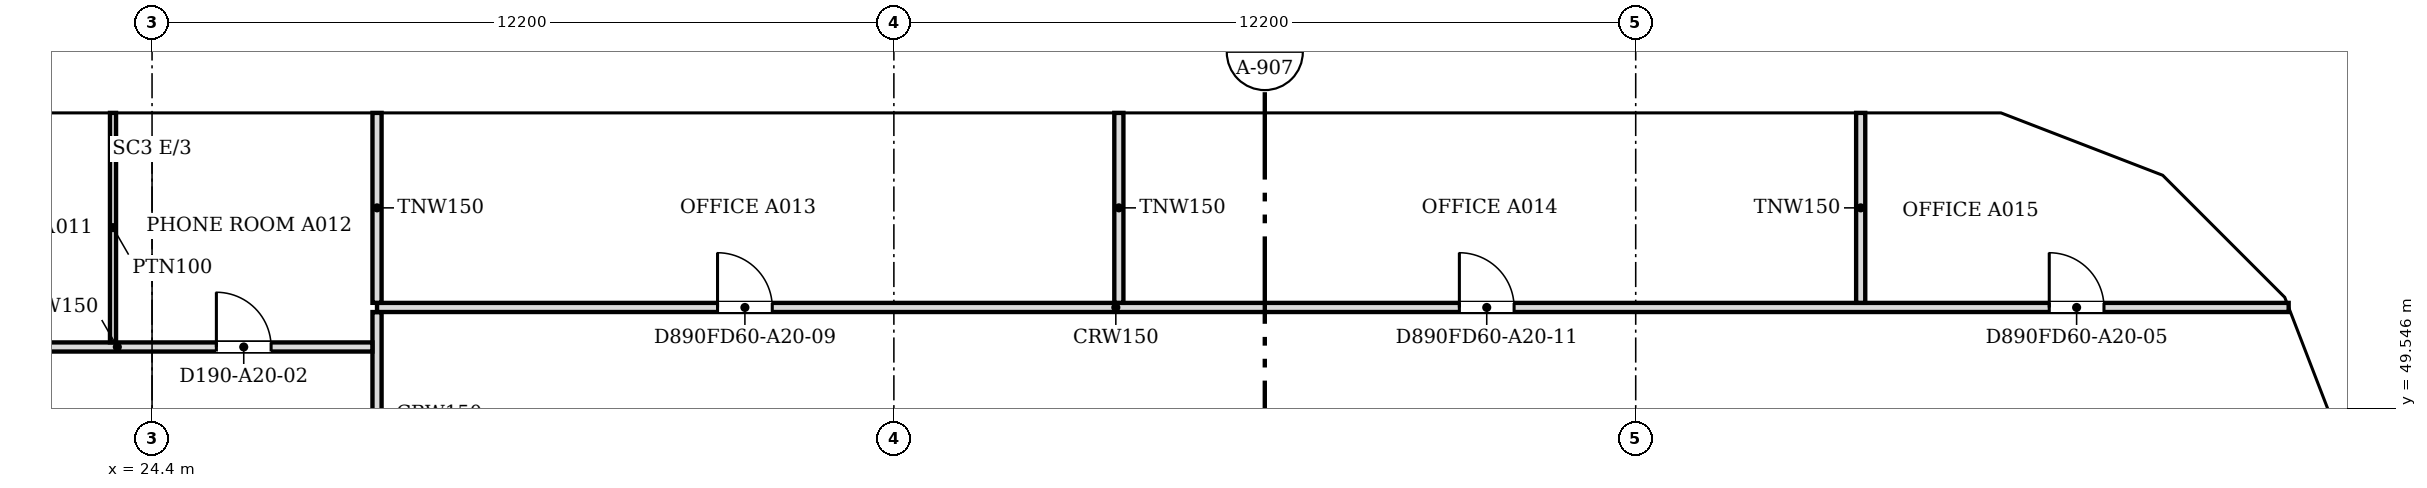
"""IFC4 building model, lengths in metres.
Left out: names, types, materials, properties, quantities, classifications, styles, units other than length and angle.
Written with IfcOpenShell. Run it as: python <this file> out.ifc"""

import sys

from ifc_helpers import new_model, si_unit, direction, frame, frame_2d, origin, place, context, subcontext, project, spatial, polyline, rectangle, outline, extrude, faceted_brep, source, transform, mapped, element, fill, save


model = new_model("IFC4")
c1 = context("Model", 3, precision=1e-05, world=origin(), true_north=direction((0.0, 1.0)))
c2 = subcontext(c1, "Body", "Model", "MODEL_VIEW")
j1 = project(units=[si_unit("LENGTHUNIT", "METRE"), si_unit("PLANEANGLEUNIT", "RADIAN")], contexts=[c1])
p1 = place(None, origin())
s1 = spatial("IfcSite", under=j1, at=p1, CompositionType="ELEMENT")
p2 = place(p1, origin())
s2 = spatial("IfcBuilding", under=s1, at=p2, CompositionType="ELEMENT")
p3 = place(p2, frame((0.0, 0.0, 220.7)))
s3 = spatial("IfcBuildingStorey", under=s2, at=p3, CompositionType="ELEMENT", Elevation=220.7)
m1 = source(origin(), c2, "Body", "Brep", [
    faceted_brep([(2.95, -0.25, 0.0), (3.003, -0.25, 0.068), (3.003, -0.25, 7.532), (2.95, -0.25, 7.6), (0.0, -0.25, 3.8), (0.047, 0.25, 3.86), (2.898, 0.25, 7.532), (2.898, 0.25, 0.068), (0.047, 0.25, 3.74), (2.95, 0.0, 0.0), (2.95, 0.0, 7.6), (0.0, 0.0, 3.8)], [[[0, 1, 2, 3, 4]], [[5, 6, 7, 8]], [[1, 0, 9]], [[10, 3, 2]], [[6, 5, 11, 4, 3, 10]], [[8, 7, 9, 0, 4, 11]], [[8, 11, 5]], [[1, 9, 7, 6, 10, 2]]]),
])
p4 = place(p3, frame((60.75, 48.753, -3.8), z_axis=(0.0, 0.0, 1.0), x_axis=(-0.35992665181, 0.932980602862, 0.0)))
e1 = element("IfcWall", 1, at=p4, inside=s3, PredefinedType="SOLIDWALL", context=c2, shape_type="MappedRepresentation", body=[
    mapped(m1, transform((0.0, 0.0, 0.0), scale=1.0)),
])
m2 = source(origin(), c2, "Body", "SweptSolid", [
    extrude(outline(polyline([(2.75, 6.935), (0.316, 3.8), (2.75, 0.665), (2.75, 6.935)])), frame((0.0, 0.26, 0.0), z_axis=(0.0, -1.0, 0.0), x_axis=(1.0, 0.0, 0.0)), (0.0, 0.0, 1.0), 0.52),
])
p5 = place(p4, origin())
e2 = element("IfcOpeningElement", 2, at=p5, cuts=e1, PredefinedType="OPENING", context=c2, shape_type="MappedRepresentation", body=[
    mapped(m2, transform((0.0, 0.0, 0.0), scale=1.0)),
])
m3 = source(origin(), c2, "Body", "Brep", [
    faceted_brep([(0.053, -0.25, 0.0), (2.997, -0.25, 3.8), (0.053, -0.25, 7.6), (0.0, -0.25, 7.532), (0.0, -0.25, 0.068), (0.106, 0.25, 7.532), (2.944, 0.25, 3.868), (2.944, 0.25, 3.732), (0.106, 0.25, 0.068), (2.997, 0.0, 3.8), (0.053, 0.0, 0.0), (0.053, 0.0, 7.6)], [[[0, 1, 2, 3, 4]], [[5, 6, 7, 8]], [[8, 7, 9, 1, 0, 10]], [[6, 5, 11, 2, 1, 9]], [[3, 2, 11]], [[10, 0, 4]], [[8, 10, 4, 3, 11, 5]], [[9, 7, 6]]]),
])
p6 = place(p3, frame((59.726, 51.469, -3.8), z_axis=(0.0, 0.0, 1.0), x_axis=(-0.707106781187, 0.707106781187, 0.0)))
e3 = element("IfcWall", 3, at=p6, inside=s3, PredefinedType="SOLIDWALL", context=c2, shape_type="MappedRepresentation", body=[
    mapped(m3, transform((0.0, 0.0, 0.0), scale=1.0)),
])
m4 = source(origin(), c2, "Body", "SweptSolid", [
    extrude(outline(polyline([(0.253, 0.667), (2.681, 3.8), (0.253, 6.934), (0.253, 0.667)])), frame((0.0, 0.26, 0.0), z_axis=(0.0, -1.0, 0.0), x_axis=(1.0, 0.0, 0.0)), (0.0, 0.0, 1.0), 0.52),
])
p7 = place(p6, origin())
e4 = element("IfcOpeningElement", 4, at=p7, cuts=e3, PredefinedType="OPENING", context=c2, shape_type="MappedRepresentation", body=[
    mapped(m4, transform((0.0, 0.0, 0.0), scale=1.0)),
])
m5 = source(origin(), c2, "Body", "Brep", [
    faceted_brep([(2.95, -0.25, 0.0), (2.997, -0.25, 0.059), (2.997, -0.25, 7.541), (2.95, -0.25, 7.6), (0.0, -0.25, 3.8), (0.053, 0.25, 3.868), (2.904, 0.25, 7.54), (2.904, 0.25, 0.06), (0.053, 0.25, 3.732), (2.95, 0.0, 0.0), (2.95, 0.0, 7.6), (0.0, 0.0, 3.8)], [[[0, 1, 2, 3, 4]], [[5, 6, 7, 8]], [[1, 0, 9]], [[10, 3, 2]], [[6, 5, 11, 4, 3, 10]], [[8, 7, 9, 0, 4, 11]], [[8, 11, 5]], [[1, 9, 7, 6, 10, 2]]]),
])
p8 = place(p3, frame((57.606, 53.588, -3.8), z_axis=(0.0, 0.0, 1.0), x_axis=(-0.932990326376, 0.359901446078, 0.0)))
e5 = element("IfcWall", 5, at=p8, inside=s3, PredefinedType="SOLIDWALL", context=c2, shape_type="MappedRepresentation", body=[
    mapped(m5, transform((0.0, 0.0, 0.0), scale=1.0)),
])
p9 = place(p8, origin())
e6 = element("IfcOpeningElement", 6, at=p9, cuts=e5, PredefinedType="OPENING", context=c2, shape_type="MappedRepresentation", body=[
    mapped(m2, transform((0.0, 0.0, 0.0), scale=1.0)),
])
m6 = source(origin(), c2, "Body", "Brep", [
    faceted_brep([(0.047, -0.25, 0.0), (3.05, -0.25, 3.8), (0.047, -0.25, 7.6), (0.0, -0.25, 7.54), (0.0, -0.25, 0.06), (0.093, 0.25, 7.541), (3.05, 0.25, 3.8), (0.093, 0.25, 0.059), (0.047, 0.0, 0.0), (0.047, 0.0, 7.6)], [[[0, 1, 2, 3, 4]], [[5, 6, 7]], [[7, 6, 1, 0, 8]], [[6, 5, 9, 2, 1]], [[3, 2, 9]], [[8, 0, 4]], [[7, 8, 4, 3, 9, 5]]]),
])
p10 = place(p3, frame((54.9, 54.65, -3.8), z_axis=(0.0, 0.0, 1.0), x_axis=(-1.0, 0.0, 0.0)))
e7 = element("IfcWall", 7, at=p10, inside=s3, PredefinedType="SOLIDWALL", context=c2, shape_type="MappedRepresentation", body=[
    mapped(m6, transform((0.0, 0.0, 0.0), scale=1.0)),
])
m7 = source(origin(), c2, "Body", "SweptSolid", [
    extrude(outline(polyline([(0.247, 0.656), (2.731, 3.8), (0.247, 6.944), (0.247, 0.656)])), frame((0.0, 0.26, 0.0), z_axis=(0.0, -1.0, 0.0), x_axis=(1.0, 0.0, 0.0)), (0.0, 0.0, 1.0), 0.52),
])
p11 = place(p10, origin())
e8 = element("IfcOpeningElement", 8, at=p11, cuts=e7, PredefinedType="OPENING", context=c2, shape_type="MappedRepresentation", body=[
    mapped(m7, transform((0.0, 0.0, 0.0), scale=1.0)),
])
m8 = source(origin(), c2, "Body", "SweptSolid", [
    extrude(outline(polyline([(3.05, 0.0), (6.1, 3.8), (3.05, 7.6), (0.0, 3.8), (3.05, 0.0)])), frame((0.0, 0.25, 0.0), z_axis=(0.0, -1.0, 0.0), x_axis=(1.0, 0.0, 0.0)), (0.0, 0.0, 1.0), 0.5),
])
p12 = place(p3, frame((51.85, 54.65, -3.8), z_axis=(0.0, 0.0, 1.0), x_axis=(-1.0, 0.0, 0.0)))
e9 = element("IfcWall", 9, at=p12, inside=s3, PredefinedType="SOLIDWALL", context=c2, shape_type="MappedRepresentation", body=[
    mapped(m8, transform((0.0, 0.0, 0.0), scale=1.0)),
])
m9 = source(origin(), c2, "Body", "SweptSolid", [
    extrude(outline(polyline([(3.05, 0.399), (5.78, 3.8), (3.05, 7.201), (0.321, 3.8), (3.05, 0.399)])), frame((0.0, 0.26, 0.0), z_axis=(0.0, -1.0, 0.0), x_axis=(1.0, 0.0, 0.0)), (0.0, 0.0, 1.0), 0.52),
])
p13 = place(p12, origin())
e10 = element("IfcOpeningElement", 10, at=p13, cuts=e9, PredefinedType="OPENING", context=c2, shape_type="MappedRepresentation", body=[
    mapped(m9, transform((0.0, 0.0, 0.0), scale=1.0)),
])
p14 = place(p3, frame((45.75, 54.65, -3.8), z_axis=(0.0, 0.0, 1.0), x_axis=(-1.0, 0.0, 0.0)))
e11 = element("IfcWall", 11, at=p14, inside=s3, PredefinedType="SOLIDWALL", context=c2, shape_type="MappedRepresentation", body=[
    mapped(m8, transform((0.0, 0.0, 0.0), scale=1.0)),
])
p15 = place(p14, origin())
e12 = element("IfcOpeningElement", 12, at=p15, cuts=e11, PredefinedType="OPENING", context=c2, shape_type="MappedRepresentation", body=[
    mapped(m9, transform((0.0, 0.0, 0.0), scale=1.0)),
])
m10 = source(origin(), c2, "Body", "Brep", [
    faceted_brep([(3.05, -0.25, 0.0), (6.1, -0.25, 3.8), (6.1, -0.25, 3.8), (3.05, -0.25, 7.6), (0.0, -0.25, 3.8), (0.0, 0.25, 3.8), (3.05, 0.25, 7.6), (6.1, 0.25, 3.8), (6.1, 0.25, 3.8), (3.05, 0.25, 0.0)], [[[0, 1, 2, 3, 4]], [[5, 6, 7, 8, 9]], [[9, 8, 1, 0]], [[7, 6, 3, 2]], [[6, 5, 4, 3]], [[5, 9, 0, 4]], [[1, 8, 7, 2]]]),
])
p16 = place(p3, frame((39.65, 54.65, -3.8), z_axis=(0.0, 0.0, 1.0), x_axis=(-1.0, 0.0, 0.0)))
e13 = element("IfcWall", 13, at=p16, inside=s3, PredefinedType="SOLIDWALL", context=c2, shape_type="MappedRepresentation", body=[
    mapped(m10, transform((0.0, 0.0, 0.0), scale=1.0)),
])
p17 = place(p16, origin())
e14 = element("IfcOpeningElement", 14, at=p17, cuts=e13, PredefinedType="OPENING", context=c2, shape_type="MappedRepresentation", body=[
    mapped(m9, transform((0.0, 0.0, 0.0), scale=1.0)),
])
p18 = place(p3, frame((33.55, 54.65, -3.8), z_axis=(0.0, 0.0, 1.0), x_axis=(-1.0, 0.0, 0.0)))
e15 = element("IfcWall", 15, at=p18, inside=s3, PredefinedType="SOLIDWALL", context=c2, shape_type="MappedRepresentation", body=[
    mapped(m8, transform((0.0, 0.0, 0.0), scale=1.0)),
])
p19 = place(p18, origin())
e16 = element("IfcOpeningElement", 16, at=p19, cuts=e15, PredefinedType="OPENING", context=c2, shape_type="MappedRepresentation", body=[
    mapped(m9, transform((0.0, 0.0, 0.0), scale=1.0)),
])
p20 = place(p3, frame((27.45, 54.65, -3.8), z_axis=(0.0, 0.0, 1.0), x_axis=(-1.0, 0.0, 0.0)))
e17 = element("IfcWall", 17, at=p20, inside=s3, PredefinedType="SOLIDWALL", context=c2, shape_type="MappedRepresentation", body=[
    mapped(m10, transform((0.0, 0.0, 0.0), scale=1.0)),
])
p21 = place(p20, origin())
e18 = element("IfcOpeningElement", 18, at=p21, cuts=e17, PredefinedType="OPENING", context=c2, shape_type="MappedRepresentation", body=[
    mapped(m9, transform((0.0, 0.0, 0.0), scale=1.0)),
])
p22 = place(p2, frame((0.0, 0.0, 224.5)))
s4 = spatial("IfcBuildingStorey", under=s2, at=p22, CompositionType="ELEMENT", Elevation=224.5)
m11 = source(origin(), c2, "Body", "Brep", [
    faceted_brep([(0.047, -0.25, 0.0), (2.997, -0.25, 3.8), (0.047, -0.25, 7.6), (0.0, -0.25, 7.541), (0.0, -0.25, 0.059), (0.093, 0.25, 7.54), (2.944, 0.25, 3.868), (2.944, 0.25, 3.732), (0.093, 0.25, 0.06), (2.997, 0.0, 3.8), (0.047, 0.0, 0.0), (0.047, 0.0, 7.6)], [[[0, 1, 2, 3, 4]], [[5, 6, 7, 8]], [[8, 7, 9, 1, 0, 10]], [[6, 5, 11, 2, 1, 9]], [[3, 2, 11]], [[10, 0, 4]], [[8, 10, 4, 3, 11, 5]], [[9, 7, 6]]]),
])
p23 = place(p22, frame((60.767, 48.71, -3.8), z_axis=(0.0, 0.0, 1.0), x_axis=(-0.359901446078, 0.932990326376, 0.0)))
e19 = element("IfcWall", 19, at=p23, inside=s4, PredefinedType="SOLIDWALL", context=c2, shape_type="MappedRepresentation", body=[
    mapped(m11, transform((0.0, 0.0, 0.0), scale=1.0)),
])
m12 = source(origin(), c2, "Body", "SweptSolid", [
    extrude(outline(polyline([(0.247, 0.665), (2.681, 3.8), (0.247, 6.935), (0.247, 0.665)])), frame((0.0, 0.26, 0.0), z_axis=(0.0, -1.0, 0.0), x_axis=(1.0, 0.0, 0.0)), (0.0, 0.0, 1.0), 0.52),
])
p24 = place(p23, origin())
e20 = element("IfcOpeningElement", 20, at=p24, cuts=e19, PredefinedType="OPENING", context=c2, shape_type="MappedRepresentation", body=[
    mapped(m12, transform((0.0, 0.0, 0.0), scale=1.0)),
])
m13 = source(origin(), c2, "Body", "Brep", [
    faceted_brep([(2.944, -0.25, 0.0), (2.997, -0.25, 0.068), (2.997, -0.25, 7.532), (2.944, -0.25, 7.6), (0.0, -0.25, 3.8), (0.053, 0.25, 3.868), (2.891, 0.25, 7.532), (2.891, 0.25, 0.068), (0.053, 0.25, 3.732), (2.944, 0.0, 0.0), (2.944, 0.0, 7.6), (0.0, 0.0, 3.8)], [[[0, 1, 2, 3, 4]], [[5, 6, 7, 8]], [[1, 0, 9]], [[10, 3, 2]], [[6, 5, 11, 4, 3, 10]], [[8, 7, 9, 0, 4, 11]], [[8, 11, 5]], [[1, 9, 7, 6, 10, 2]]]),
])
p25 = place(p22, frame((59.688, 51.506, -3.8), z_axis=(0.0, 0.0, 1.0), x_axis=(-0.707106781187, 0.707106781187, 0.0)))
e21 = element("IfcWall", 21, at=p25, inside=s4, PredefinedType="SOLIDWALL", context=c2, shape_type="MappedRepresentation", body=[
    mapped(m13, transform((0.0, 0.0, 0.0), scale=1.0)),
])
m14 = source(origin(), c2, "Body", "SweptSolid", [
    extrude(outline(polyline([(2.744, 6.934), (0.316, 3.8), (2.744, 0.666), (2.744, 6.934)])), frame((0.0, 0.26, 0.0), z_axis=(0.0, -1.0, 0.0), x_axis=(1.0, 0.0, 0.0)), (0.0, 0.0, 1.0), 0.52),
])
p26 = place(p25, origin())
e22 = element("IfcOpeningElement", 22, at=p26, cuts=e21, PredefinedType="OPENING", context=c2, shape_type="MappedRepresentation", body=[
    mapped(m14, transform((0.0, 0.0, 0.0), scale=1.0)),
])
m15 = source(origin(), c2, "Body", "Brep", [
    faceted_brep([(0.053, -0.25, 0.0), (3.003, -0.25, 3.8), (0.053, -0.25, 7.6), (0.0, -0.25, 7.532), (0.0, -0.25, 0.068), (0.106, 0.25, 7.532), (2.957, 0.25, 3.86), (2.957, 0.25, 3.74), (0.106, 0.25, 0.068), (3.003, 0.0, 3.8), (0.053, 0.0, 0.0), (0.053, 0.0, 7.6)], [[[0, 1, 2, 3, 4]], [[5, 6, 7, 8]], [[8, 7, 9, 1, 0, 10]], [[6, 5, 11, 2, 1, 9]], [[3, 2, 11]], [[10, 0, 4]], [[8, 10, 4, 3, 11, 5]], [[9, 7, 6]]]),
])
p27 = place(p22, frame((57.656, 53.569, -3.8), z_axis=(0.0, 0.0, 1.0), x_axis=(-0.933007896601, 0.359855894603, 0.0)))
e23 = element("IfcWall", 23, at=p27, inside=s4, PredefinedType="SOLIDWALL", context=c2, shape_type="MappedRepresentation", body=[
    mapped(m15, transform((0.0, 0.0, 0.0), scale=1.0)),
])
m16 = source(origin(), c2, "Body", "SweptSolid", [
    extrude(outline(polyline([(0.253, 0.665), (2.687, 3.8), (0.253, 6.935), (0.253, 0.665)])), frame((0.0, 0.26, 0.0), z_axis=(0.0, -1.0, 0.0), x_axis=(1.0, 0.0, 0.0)), (0.0, 0.0, 1.0), 0.52),
])
p28 = place(p27, origin())
e24 = element("IfcOpeningElement", 24, at=p28, cuts=e23, PredefinedType="OPENING", context=c2, shape_type="MappedRepresentation", body=[
    mapped(m16, transform((0.0, 0.0, 0.0), scale=1.0)),
])
m17 = source(origin(), c2, "Body", "Brep", [
    faceted_brep([(3.003, -0.25, 0.0), (6.053, -0.25, 3.8), (3.003, -0.25, 7.6), (0.0, -0.25, 3.8), (0.047, 0.25, 3.859), (3.003, 0.25, 7.6), (6.053, 0.25, 3.8), (3.003, 0.25, 0.0), (0.047, 0.25, 3.741), (0.0, 0.0, 3.8)], [[[0, 1, 2, 3]], [[4, 5, 6, 7, 8]], [[7, 6, 1, 0]], [[6, 5, 2, 1]], [[5, 4, 9, 3, 2]], [[8, 7, 0, 3, 9]], [[8, 9, 4]]]),
])
p29 = place(p22, frame((54.854, 54.65, -3.8), z_axis=(0.0, 0.0, 1.0), x_axis=(-1.0, 0.0, 0.0)))
e25 = element("IfcWall", 25, at=p29, inside=s4, PredefinedType="SOLIDWALL", context=c2, shape_type="MappedRepresentation", body=[
    mapped(m17, transform((0.0, 0.0, 0.0), scale=1.0)),
])
m18 = source(origin(), c2, "Body", "SweptSolid", [
    extrude(outline(polyline([(3.005, 0.401), (5.733, 3.8), (3.005, 7.199), (0.319, 3.8), (3.005, 0.401)])), frame((0.0, 0.26, 0.0), z_axis=(0.0, -1.0, 0.0), x_axis=(1.0, 0.0, 0.0)), (0.0, 0.0, 1.0), 0.52),
])
p30 = place(p29, origin())
e26 = element("IfcOpeningElement", 26, at=p30, cuts=e25, PredefinedType="OPENING", context=c2, shape_type="MappedRepresentation", body=[
    mapped(m18, transform((0.0, 0.0, 0.0), scale=1.0)),
])
p31 = place(p22, frame((48.8, 54.65, -3.8), z_axis=(0.0, 0.0, 1.0), x_axis=(-1.0, 0.0, 0.0)))
e27 = element("IfcWall", 27, at=p31, inside=s4, PredefinedType="SOLIDWALL", context=c2, shape_type="MappedRepresentation", body=[
    mapped(m8, transform((0.0, 0.0, 0.0), scale=1.0)),
])
p32 = place(p31, origin())
e28 = element("IfcOpeningElement", 28, at=p32, cuts=e27, PredefinedType="OPENING", context=c2, shape_type="MappedRepresentation", body=[
    mapped(m9, transform((0.0, 0.0, 0.0), scale=1.0)),
])
p33 = place(p22, frame((42.7, 54.65, -3.8), z_axis=(0.0, 0.0, 1.0), x_axis=(-1.0, 0.0, 0.0)))
e29 = element("IfcWall", 29, at=p33, inside=s4, PredefinedType="SOLIDWALL", context=c2, shape_type="MappedRepresentation", body=[
    mapped(m10, transform((0.0, 0.0, 0.0), scale=1.0)),
])
p34 = place(p33, origin())
e30 = element("IfcOpeningElement", 30, at=p34, cuts=e29, PredefinedType="OPENING", context=c2, shape_type="MappedRepresentation", body=[
    mapped(m9, transform((0.0, 0.0, 0.0), scale=1.0)),
])
p35 = place(p22, frame((36.6, 54.65, -3.8), z_axis=(0.0, 0.0, 1.0), x_axis=(-1.0, 0.0, 0.0)))
e31 = element("IfcWall", 31, at=p35, inside=s4, PredefinedType="SOLIDWALL", context=c2, shape_type="MappedRepresentation", body=[
    mapped(m8, transform((0.0, 0.0, 0.0), scale=1.0)),
])
p36 = place(p35, origin())
e32 = element("IfcOpeningElement", 32, at=p36, cuts=e31, PredefinedType="OPENING", context=c2, shape_type="MappedRepresentation", body=[
    mapped(m9, transform((0.0, 0.0, 0.0), scale=1.0)),
])
p37 = place(p22, frame((30.5, 54.65, -3.8), z_axis=(0.0, 0.0, 1.0), x_axis=(-1.0, 0.0, 0.0)))
e33 = element("IfcWall", 33, at=p37, inside=s4, PredefinedType="SOLIDWALL", context=c2, shape_type="MappedRepresentation", body=[
    mapped(m8, transform((0.0, 0.0, 0.0), scale=1.0)),
])
p38 = place(p37, origin())
e34 = element("IfcOpeningElement", 34, at=p38, cuts=e33, PredefinedType="OPENING", context=c2, shape_type="MappedRepresentation", body=[
    mapped(m9, transform((0.0, 0.0, 0.0), scale=1.0)),
])
p39 = place(p22, frame((24.4, 54.65, -3.8), z_axis=(0.0, 0.0, 1.0), x_axis=(-1.0, 0.0, 0.0)))
e35 = element("IfcWall", 35, at=p39, inside=s4, PredefinedType="SOLIDWALL", context=c2, shape_type="MappedRepresentation", body=[
    mapped(m10, transform((0.0, 0.0, 0.0), scale=1.0)),
])
p40 = place(p39, origin())
e36 = element("IfcOpeningElement", 36, at=p40, cuts=e35, PredefinedType="OPENING", context=c2, shape_type="MappedRepresentation", body=[
    mapped(m9, transform((0.0, 0.0, 0.0), scale=1.0)),
])
p41 = place(p3, frame((28.1, 47.776, 0.0), z_axis=(0.0, 0.0, 1.0), x_axis=(0.0, 1.0, 0.0)))
e37 = element("IfcWall", 37, at=p41, inside=s3, PredefinedType="PARTITIONING", context=c2, shape_type="SweptSolid", body=[
    extrude(rectangle(XDim=3.348, YDim=0.15, at=frame_2d((1.674, 0.0))), origin(), (0.0, 0.0, 1.0), 3.067),
])
p42 = place(p3, frame((19.7, 50.55, 0.0), z_axis=(0.0, 0.0, 1.0), x_axis=(1.0, 0.0, 0.0)))
e38 = element("IfcWall", 38, at=p42, inside=s3, PredefinedType="PARTITIONING", context=c2, shape_type="SweptSolid", body=[
    extrude(rectangle(XDim=8.324, YDim=0.15, at=frame_2d((4.162, 0.0))), origin(), (0.0, 0.0, 1.0), 3.067),
])
m19 = source(origin(), c2, "Body", "SweptSolid", [
    extrude(rectangle(XDim=0.9, YDim=2.1, at=frame_2d((0.45, 1.05))), frame((0.0, 0.085, 0.0), z_axis=(0.0, -1.0, 0.0), x_axis=(1.0, 0.0, 0.0)), (0.0, 0.0, 1.0), 0.17),
])
p43 = place(p42, frame((1.6, 0.0, 0.0)))
e39 = element("IfcOpeningElement", 39, at=p43, cuts=e38, PredefinedType="OPENING", context=c2, shape_type="MappedRepresentation", body=[
    mapped(m19, transform((0.0, 0.0, 0.0), scale=1.0)),
])
p44 = place(p42, frame((5.758, 0.0, 0.0)))
e40 = element("IfcOpeningElement", 40, at=p44, cuts=e38, PredefinedType="OPENING", context=c2, shape_type="MappedRepresentation", body=[
    mapped(m19, transform((0.0, 0.0, 0.0), scale=1.0)),
])
p45 = place(p3, frame((23.758, 50.626, 0.0), z_axis=(0.0, 0.0, 1.0), x_axis=(0.0, 1.0, 0.0)))
e41 = element("IfcWall", 41, at=p45, inside=s3, PredefinedType="PARTITIONING", context=c2, shape_type="SweptSolid", body=[
    extrude(rectangle(XDim=3.774, YDim=0.1, at=frame_2d((1.887, 0.0))), origin(), (0.0, 0.0, 1.0), 3.067),
])
p46 = place(p3, frame((28.1, 51.2, 0.0), z_axis=(0.0, 0.0, 1.0), x_axis=(1.0, 0.0, 0.0)))
e42 = element("IfcWall", 42, at=p46, inside=s3, PredefinedType="PARTITIONING", context=c2, shape_type="SweptSolid", body=[
    extrude(rectangle(XDim=31.438, YDim=0.15, at=frame_2d((15.719, 0.0))), origin(), (0.0, 0.0, 1.0), 3.067),
])
p47 = place(p46, frame((27.501, 0.0, 0.0)))
e43 = element("IfcOpeningElement", 43, at=p47, cuts=e42, PredefinedType="OPENING", context=c2, shape_type="MappedRepresentation", body=[
    mapped(m19, transform((0.0, 0.0, 0.0), scale=1.0)),
])
p48 = place(p46, frame((5.6, 0.0, 0.0)))
e44 = element("IfcOpeningElement", 44, at=p48, cuts=e42, PredefinedType="OPENING", context=c2, shape_type="MappedRepresentation", body=[
    mapped(m19, transform((0.0, 0.0, 0.0), scale=1.0)),
])
p49 = place(p46, frame((17.8, 0.0, 0.0)))
e45 = element("IfcOpeningElement", 45, at=p49, cuts=e42, PredefinedType="OPENING", context=c2, shape_type="MappedRepresentation", body=[
    mapped(m19, transform((0.0, 0.0, 0.0), scale=1.0)),
])
for number, where, z_axis, x_axis in (
    (46, (28.1, 51.276, 0.0), (0.0, 0.0, 1.0), (0.0, 1.0, 0.0)),
    (47, (40.3, 51.276, 0.0), (0.0, 0.0, 1.0), (0.0, 1.0, 0.0)),
    (48, (52.5, 51.276, 0.0), (0.0, 0.0, 1.0), (0.0, 1.0, 0.0)),
):
    element("IfcWall", number, at=place(p3, frame(where, z_axis=z_axis, x_axis=x_axis)), inside=s3, PredefinedType="PARTITIONING", context=c2, shape_type="SweptSolid", body=[
        extrude(rectangle(XDim=3.124, YDim=0.15, at=frame_2d((1.562, 0.0))), origin(), (0.0, 0.0, 1.0), 3.067),
    ])
m20 = source(origin(), c2, "Body", "SweptSolid", [
    extrude(rectangle(XDim=0.9, YDim=2.1, at=frame_2d((0.45, 1.05))), frame((0.0, 0.025, 0.0), z_axis=(0.0, -1.0, 0.0), x_axis=(1.0, 0.0, 0.0)), (0.0, 0.0, 1.0), 0.05),
])
p50 = place(p44, origin())
e49 = element("IfcDoor", 49, at=p50, inside=s3, OperationType="SINGLE_SWING_LEFT", PredefinedType="DOOR", context=c2, shape_type="MappedRepresentation", body=[
    mapped(m20, transform((0.0, 0.0, 0.0), scale=1.0)),
])
fill(e40, e49)
p51 = place(p47, origin())
e50 = element("IfcDoor", 50, at=p51, inside=s3, OperationType="SINGLE_SWING_LEFT", PredefinedType="DOOR", context=c2, shape_type="MappedRepresentation", body=[
    mapped(m20, transform((0.0, 0.0, 0.0), scale=1.0)),
])
fill(e43, e50)
p52 = place(p48, origin())
e51 = element("IfcDoor", 51, at=p52, inside=s3, OperationType="SINGLE_SWING_LEFT", PredefinedType="DOOR", context=c2, shape_type="MappedRepresentation", body=[
    mapped(m20, transform((0.0, 0.0, 0.0), scale=1.0)),
])
fill(e44, e51)
p53 = place(p49, origin())
e52 = element("IfcDoor", 52, at=p53, inside=s3, OperationType="SINGLE_SWING_LEFT", PredefinedType="DOOR", context=c2, shape_type="MappedRepresentation", body=[
    mapped(m20, transform((0.0, 0.0, 0.0), scale=1.0)),
])
fill(e45, e52)
save(model, sys.argv[1])
